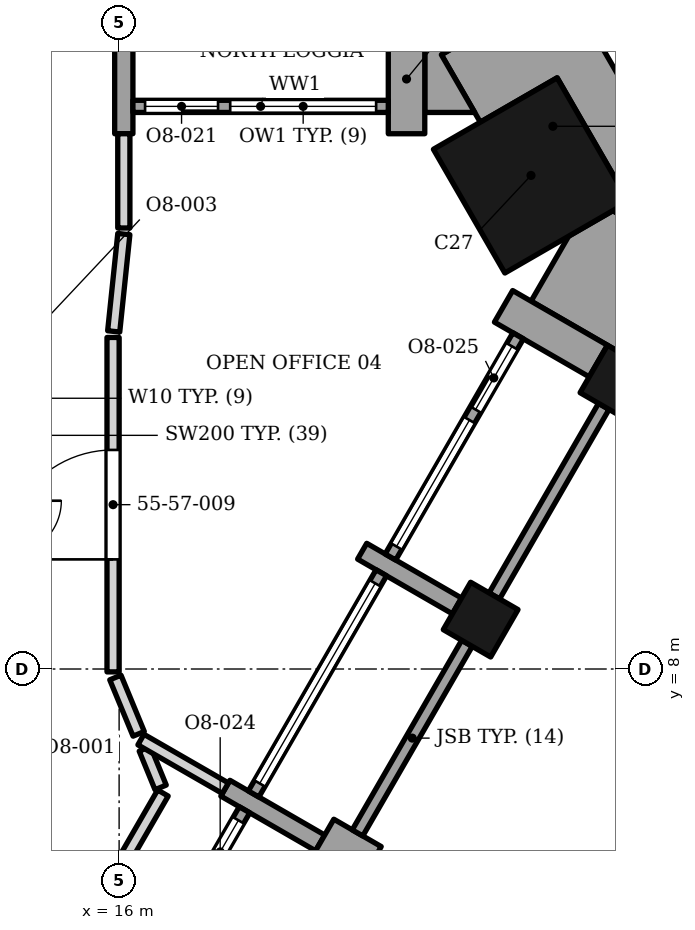
"""IFC4 building model, lengths in metres.
Left out: names, types, materials, properties, quantities, classifications, styles, units other than length and angle.
Written with IfcOpenShell. Run it as: python <this file> out.ifc"""

import sys

from ifc_helpers import new_model, si_unit, direction, frame, frame_2d, origin, origin_2d, place, context, subcontext, project, spatial, polyline, rectangle, outline, extrude, element, fill, save


model = new_model("IFC4")
c1 = context("Model", 3, precision=1e-05, world=origin(), true_north=direction((0.0, 1.0)))
c2 = subcontext(c1, "Body", "Model", "MODEL_VIEW")
j1 = project(units=[si_unit("LENGTHUNIT", "METRE"), si_unit("PLANEANGLEUNIT", "RADIAN")], contexts=[c1])
p1 = place(None, origin())
s1 = spatial("IfcSite", under=j1, at=p1, CompositionType="ELEMENT")
p2 = place(p1, origin())
s2 = spatial("IfcBuilding", under=s1, at=p2, CompositionType="ELEMENT")
p3 = place(p2, frame((0.0, 0.0, 231.5)))
s3 = spatial("IfcBuildingStorey", under=s2, at=p3, CompositionType="ELEMENT", Elevation=231.5)
p4 = place(p3, frame((22.774, 16.117, 0.0), z_axis=(0.0, 0.0, 1.0), x_axis=(-0.866025412511, -0.499999984885, 0.0)))
e1 = element("IfcColumn", 1, at=p4, inside=s3, PredefinedType="COLUMN", context=c2, shape_type="SweptSolid", body=[
    extrude(rectangle(XDim=2.35, YDim=2.35, at=origin_2d()), origin(), (0.0, 0.0, 1.0), 3.9),
])
for number, where, z_axis, x_axis in (
    (2, (21.946, 8.812, 0.0), (0.0, 0.0, 1.0), (0.5, 0.866, 0.0)),
    (3, (24.196, 12.709, 0.0), (0.0, 0.0, 1.0), (0.5, 0.866, 0.0)),
):
    element("IfcColumn", number, at=place(p3, frame(where, z_axis=z_axis, x_axis=x_axis)), inside=s3, PredefinedType="COLUMN", context=c2, shape_type="SweptSolid", body=[
        extrude(rectangle(XDim=0.9, YDim=0.9, at=origin_2d()), origin(), (0.0, 0.0, 1.0), 3.9),
    ])
p5 = place(p3, frame((19.306, 5.14, 0.0), z_axis=(0.0, 0.0, 1.0), x_axis=(0.865896406789, -0.500223362819, 0.0)))
e4 = element("IfcWall", 4, at=p5, inside=s3, PredefinedType="SOLIDWALL", context=c2, shape_type="SweptSolid", body=[
    extrude(rectangle(XDim=0.9, YDim=0.9, at=frame_2d((0.45, 0.0))), origin(), (0.0, 0.0, 1.0), 3.0),
])
p6 = place(p3, frame((19.306, 5.14, 0.0), z_axis=(0.0, 0.0, 1.0), x_axis=(-0.866047807691, 0.499961193289, 0.0)))
e5 = element("IfcWall", 5, at=p6, inside=s3, PredefinedType="SOLIDWALL", context=c2, shape_type="SweptSolid", body=[
    extrude(rectangle(XDim=1.8, YDim=0.3, at=frame_2d((0.9, 0.0))), origin(), (0.0, 0.0, 1.0), 3.0),
])
p7 = place(p3, frame((21.556, 9.037, 0.0), z_axis=(0.0, 0.0, 1.0), x_axis=(-0.866047807691, 0.499961193289, 0.0)))
e6 = element("IfcWall", 6, at=p7, inside=s3, PredefinedType="SOLIDWALL", context=c2, shape_type="SweptSolid", body=[
    extrude(rectangle(XDim=1.8, YDim=0.3, at=frame_2d((0.9, 0.0))), origin(), (0.0, 0.0, 1.0), 2.95),
])
p8 = place(p3, frame((23.881, 13.064, 0.0), z_axis=(0.0, 0.0, 1.0), x_axis=(-0.866047807691, 0.499961193289, 0.0)))
e7 = element("IfcWall", 7, at=p8, inside=s3, PredefinedType="SOLIDWALL", context=c2, shape_type="SweptSolid", body=[
    extrude(rectangle(XDim=1.8, YDim=0.6, at=frame_2d((0.9, 0.0))), origin(), (0.0, 0.0, 1.0), 3.0),
])
p9 = place(p3, frame((15.962, 2.048, 0.0), z_axis=(0.0, 0.0, 1.0), x_axis=(0.500027713859, 0.866009402589, 0.0)))
e8 = element("IfcWall", 8, at=p9, inside=s3, PredefinedType="ELEMENTEDWALL", context=c2, shape_type="SweptSolid", body=[
    extrude(rectangle(XDim=4.2, YDim=0.2, at=frame_2d((2.1, 0.0))), origin(), (0.0, 0.0, 1.0), 3.0),
])
p10 = place(p9, frame((0.2, 0.0, 0.45)))
e9 = element("IfcOpeningElement", 9, at=p10, cuts=e8, PredefinedType="OPENING", context=c2, shape_type="SweptSolid", body=[
    extrude(rectangle(XDim=2.4, YDim=2.25, at=frame_2d((1.2, 1.125))), frame((0.0, 0.11, 0.0), z_axis=(0.0, -1.0, 0.0), x_axis=(1.0, 0.0, 0.0)), (0.0, 0.0, 1.0), 0.22),
])
p11 = place(p9, frame((2.8, 0.0, 0.0)))
e10 = element("IfcOpeningElement", 10, at=p11, cuts=e8, PredefinedType="OPENING", context=c2, shape_type="SweptSolid", body=[
    extrude(rectangle(XDim=1.2, YDim=2.7, at=frame_2d((0.6, 1.35))), frame((0.0, 0.11, 0.0), z_axis=(0.0, -1.0, 0.0), x_axis=(1.0, 0.0, 0.0)), (0.0, 0.0, 1.0), 0.22),
])
p12 = place(p3, frame((19.921, 5.305, 0.0), z_axis=(0.0, 0.0, 1.0), x_axis=(0.500012057535, 0.866018442252, 0.0)))
e11 = element("IfcWall", 11, at=p12, inside=s3, PredefinedType="SOLIDWALL", context=c2, shape_type="SweptSolid", body=[
    extrude(rectangle(XDim=3.6, YDim=0.2, at=frame_2d((1.8, 0.0))), origin(), (0.0, 0.0, 1.0), 3.0),
])
p13 = place(p3, frame((18.212, 5.945, 0.0), z_axis=(0.0, 0.0, 1.0), x_axis=(0.500002543286, 0.866023935413, 0.0)))
e12 = element("IfcWall", 12, at=p13, inside=s3, PredefinedType="ELEMENTEDWALL", context=c2, shape_type="SweptSolid", body=[
    extrude(rectangle(XDim=4.2, YDim=0.2, at=frame_2d((2.1, 0.0))), origin(), (0.0, 0.0, 1.0), 2.95),
])
p14 = place(p13, frame((0.2, 0.0, 0.45)))
e13 = element("IfcOpeningElement", 13, at=p14, cuts=e12, PredefinedType="OPENING", context=c2, shape_type="SweptSolid", body=[
    extrude(rectangle(XDim=3.8, YDim=2.25, at=frame_2d((1.9, 1.125))), frame((0.0, 0.11, 0.0), z_axis=(0.0, -1.0, 0.0), x_axis=(1.0, 0.0, 0.0)), (0.0, 0.0, 1.0), 0.22),
])
p15 = place(p3, frame((22.171, 9.202, 0.0), z_axis=(0.0, 0.0, 1.0), x_axis=(0.500012057535, 0.866018442252, 0.0)))
e14 = element("IfcWall", 14, at=p15, inside=s3, PredefinedType="SOLIDWALL", context=c2, shape_type="SweptSolid", body=[
    extrude(rectangle(XDim=3.6, YDim=0.2, at=frame_2d((1.8, 0.0))), origin(), (0.0, 0.0, 1.0), 3.0),
])
p16 = place(p3, frame((20.462, 9.842, 0.0), z_axis=(0.0, 0.0, 1.0), x_axis=(0.500027713859, 0.866009402589, 0.0)))
e15 = element("IfcWall", 15, at=p16, inside=s3, PredefinedType="ELEMENTEDWALL", context=c2, shape_type="SweptSolid", body=[
    extrude(rectangle(XDim=4.2, YDim=0.2, at=frame_2d((2.1, 0.0))), origin(), (0.0, 0.0, 1.0), 3.0),
])
p17 = place(p16, frame((0.2, 0.0, 0.45)))
e16 = element("IfcOpeningElement", 16, at=p17, cuts=e15, PredefinedType="OPENING", context=c2, shape_type="SweptSolid", body=[
    extrude(rectangle(XDim=2.4, YDim=2.25, at=frame_2d((1.2, 1.125))), frame((0.0, 0.11, 0.0), z_axis=(0.0, -1.0, 0.0), x_axis=(1.0, 0.0, 0.0)), (0.0, 0.0, 1.0), 0.22),
])
p18 = place(p16, frame((2.8, 0.0, 0.0)))
e17 = element("IfcOpeningElement", 17, at=p18, cuts=e15, PredefinedType="OPENING", context=c2, shape_type="SweptSolid", body=[
    extrude(rectangle(XDim=1.2, YDim=2.7, at=frame_2d((0.6, 1.35))), frame((0.0, 0.11, 0.0), z_axis=(0.0, -1.0, 0.0), x_axis=(1.0, 0.0, 0.0)), (0.0, 0.0, 1.0), 0.22),
])
p19 = place(p3, origin())
e18 = element("IfcWall", 18, at=p19, inside=s3, PredefinedType="SOLIDWALL", context=c2, shape_type="SweptSolid", body=[
    extrude(outline(polyline([(21.027, 16.802), (21.027, 18.603), (20.427, 18.603), (20.427, 16.802), (21.027, 16.802)])), origin(), (0.0, 0.0, 1.0), 3.0),
])
p20 = place(p3, origin())
e19 = element("IfcWall", 19, at=p20, inside=s3, PredefinedType="SOLIDWALL", context=c2, shape_type="SweptSolid", body=[
    extrude(outline(polyline([(15.927, 18.603), (15.927, 16.802), (16.227, 16.802), (16.227, 18.603), (15.927, 18.603)])), origin(), (0.0, 0.0, 1.0), 3.0),
])
p21 = place(p3, frame((20.427, 17.252, 0.0), z_axis=(0.0, 0.0, 1.0), x_axis=(-1.0, 0.0, 0.0)))
e20 = element("IfcWall", 20, at=p21, inside=s3, PredefinedType="ELEMENTEDWALL", context=c2, shape_type="SweptSolid", body=[
    extrude(rectangle(XDim=4.2, YDim=0.2, at=frame_2d((2.1, 0.0))), origin(), (0.0, 0.0, 1.0), 3.0),
])
p22 = place(p21, frame((0.2, 0.0, 0.45)))
e21 = element("IfcOpeningElement", 21, at=p22, cuts=e20, PredefinedType="OPENING", context=c2, shape_type="SweptSolid", body=[
    extrude(rectangle(XDim=2.4, YDim=2.25, at=frame_2d((1.2, 1.125))), frame((0.0, 0.11, 0.0), z_axis=(0.0, -1.0, 0.0), x_axis=(1.0, 0.0, 0.0)), (0.0, 0.0, 1.0), 0.22),
])
p23 = place(p21, frame((2.8, 0.0, 0.0)))
e22 = element("IfcOpeningElement", 22, at=p23, cuts=e20, PredefinedType="OPENING", context=c2, shape_type="SweptSolid", body=[
    extrude(rectangle(XDim=1.2, YDim=2.7, at=frame_2d((0.6, 1.35))), frame((0.0, 0.11, 0.0), z_axis=(0.0, -1.0, 0.0), x_axis=(1.0, 0.0, 0.0)), (0.0, 0.0, 1.0), 0.22),
])
p24 = place(p3, origin())
e23 = element("IfcWall", 23, at=p24, inside=s3, PredefinedType="SOLIDWALL", context=c2, shape_type="SweptSolid", body=[
    extrude(outline(polyline([(23.392, 15.117), (22.776, 14.049), (24.364, 13.132), (24.364, 13.861), (25.353, 14.825), (24.12, 15.537), (23.392, 15.117)])), origin(), (0.0, 0.0, 1.0), 3.0),
])
p25 = place(p3, origin())
e24 = element("IfcWall", 24, at=p25, inside=s3, PredefinedType="SOLIDWALL", context=c2, shape_type="SweptSolid", body=[
    extrude(outline(polyline([(23.204, 17.722), (24.379, 15.687), (24.12, 15.537), (25.353, 14.825), (25.706, 15.17), (23.334, 19.278), (21.299, 18.103), (21.94, 16.992), (23.204, 17.722)])), origin(), (0.0, 0.0, 1.0), 3.0),
])
p26 = place(p3, origin())
e25 = element("IfcWall", 25, at=p26, inside=s3, PredefinedType="SOLIDWALL", context=c2, shape_type="SweptSolid", body=[
    extrude(outline(polyline([(21.027, 18.884), (21.027, 17.153), (21.848, 17.153), (21.299, 18.103), (22.945, 19.052), (22.945, 19.24), (21.978, 18.884), (21.027, 18.884)])), origin(), (0.0, 0.0, 1.0), 3.0),
])
p27 = place(p3, frame((15.531, 3.9, 0.0), z_axis=(0.0, 0.0, 1.0), x_axis=(0.500122053881, 0.865954924474, 0.0)))
e26 = element("IfcWall", 26, at=p27, inside=s3, PredefinedType="PARTITIONING", context=c2, shape_type="SweptSolid", body=[
    extrude(rectangle(XDim=2.38, YDim=0.2, at=frame_2d((1.19, 0.0))), origin(), (0.0, 0.0, 1.0), 3.128),
])
p28 = place(p3, frame((16.423, 6.687, 0.0), z_axis=(0.0, 0.0, 1.0), x_axis=(0.37899342687, -0.925399363729, 0.0)))
e27 = element("IfcWall", 27, at=p28, inside=s3, PredefinedType="PARTITIONING", context=c2, shape_type="SweptSolid", body=[
    extrude(rectangle(XDim=0.685, YDim=0.2, at=frame_2d((0.343, 0.0))), origin(), (0.0, 0.0, 1.0), 3.73),
])
p29 = place(p3, frame((16.359, 6.839, 0.0), z_axis=(0.0, 0.0, 1.0), x_axis=(0.866578526371, -0.499040737448, 0.0)))
e28 = element("IfcWall", 28, at=p29, inside=s3, PredefinedType="PARTITIONING", context=c2, shape_type="SweptSolid", body=[
    extrude(rectangle(XDim=1.602, YDim=0.2, at=frame_2d((0.801, 0.0))), origin(), (0.0, 0.0, 1.0), 3.73),
])
p30 = place(p3, frame((15.939, 7.86, 0.0), z_axis=(0.0, 0.0, 1.0), x_axis=(0.38186417336, -0.924218455293, 0.0)))
e29 = element("IfcWall", 29, at=p30, inside=s3, PredefinedType="PARTITIONING", context=c2, shape_type="SweptSolid", body=[
    extrude(rectangle(XDim=1.002, YDim=0.2, at=frame_2d((0.501, 0.0))), origin(), (0.0, 0.0, 1.0), 3.73),
])
p31 = place(p3, frame((15.9, 7.953, 0.0), z_axis=(0.0, 0.0, 1.0), x_axis=(0.0, 1.0, 0.0)))
e30 = element("IfcWall", 30, at=p31, inside=s3, PredefinedType="PARTITIONING", context=c2, shape_type="SweptSolid", body=[
    extrude(rectangle(XDim=5.5, YDim=0.2, at=frame_2d((2.75, 0.0))), origin(), (0.0, 0.0, 1.0), 2.95),
])
p32 = place(p31, frame((1.85, 0.0, 0.0)))
e31 = element("IfcOpeningElement", 31, at=p32, cuts=e30, PredefinedType="OPENING", context=c2, shape_type="SweptSolid", body=[
    extrude(rectangle(XDim=1.8, YDim=2.4, at=frame_2d((0.9, 1.2))), frame((0.0, 0.11, 0.0), z_axis=(0.0, -1.0, 0.0), x_axis=(1.0, 0.0, 0.0)), (0.0, 0.0, 1.0), 0.22),
])
p33 = place(p3, frame((15.911, 13.552, 0.0), z_axis=(0.0, 0.0, 1.0), x_axis=(0.103468505511, 0.994632730392, 0.0)))
e32 = element("IfcWall", 32, at=p33, inside=s3, PredefinedType="PARTITIONING", context=c2, shape_type="SweptSolid", body=[
    extrude(rectangle(XDim=1.609, YDim=0.2, at=frame_2d((0.805, 0.0))), origin(), (0.0, 0.0, 1.0), 3.128),
])
p34 = place(p3, frame((16.077, 15.252, 0.0), z_axis=(0.0, 0.0, 1.0), x_axis=(0.0, 1.0, 0.0)))
e33 = element("IfcWall", 33, at=p34, inside=s3, PredefinedType="PARTITIONING", context=c2, shape_type="SweptSolid", body=[
    extrude(rectangle(XDim=1.55, YDim=0.2, at=frame_2d((0.775, 0.0))), origin(), (0.0, 0.0, 1.0), 3.73),
])
p35 = place(p11, origin())
e34 = element("IfcDoor", 34, at=p35, inside=s3, OperationType="SINGLE_SWING_LEFT", PredefinedType="DOOR", context=c2, shape_type="SweptSolid", body=[
    extrude(rectangle(XDim=1.2, YDim=2.7, at=frame_2d((0.6, 1.35))), frame((0.0, 0.025, 0.0), z_axis=(0.0, -1.0, 0.0), x_axis=(1.0, 0.0, 0.0)), (0.0, 0.0, 1.0), 0.05),
])
fill(e10, e34)
p36 = place(p14, origin())
e35 = element("IfcWindow", 35, at=p36, inside=s3, PartitioningType="SINGLE_PANEL", PredefinedType="WINDOW", context=c2, shape_type="SweptSolid", body=[
    extrude(rectangle(XDim=3.8, YDim=2.25, at=frame_2d((1.9, 1.125))), frame((0.0, 0.03, 0.0), z_axis=(0.0, -1.0, 0.0), x_axis=(1.0, 0.0, 0.0)), (0.0, 0.0, 1.0), 0.06),
])
fill(e13, e35)
p37 = place(p17, origin())
e36 = element("IfcWindow", 36, at=p37, inside=s3, PartitioningType="SINGLE_PANEL", PredefinedType="WINDOW", context=c2, shape_type="SweptSolid", body=[
    extrude(rectangle(XDim=2.4, YDim=2.25, at=frame_2d((1.2, 1.125))), frame((0.0, 0.03, 0.0), z_axis=(0.0, -1.0, 0.0), x_axis=(1.0, 0.0, 0.0)), (0.0, 0.0, 1.0), 0.06),
])
fill(e16, e36)
p38 = place(p18, origin())
e37 = element("IfcDoor", 37, at=p38, inside=s3, OperationType="SINGLE_SWING_LEFT", PredefinedType="DOOR", context=c2, shape_type="SweptSolid", body=[
    extrude(rectangle(XDim=1.2, YDim=2.7, at=frame_2d((0.6, 1.35))), frame((0.0, 0.025, 0.0), z_axis=(0.0, -1.0, 0.0), x_axis=(1.0, 0.0, 0.0)), (0.0, 0.0, 1.0), 0.05),
])
fill(e17, e37)
p39 = place(p22, origin())
e38 = element("IfcWindow", 38, at=p39, inside=s3, PartitioningType="SINGLE_PANEL", PredefinedType="WINDOW", context=c2, shape_type="SweptSolid", body=[
    extrude(rectangle(XDim=2.4, YDim=2.25, at=frame_2d((1.2, 1.125))), frame((0.0, 0.03, 0.0), z_axis=(0.0, -1.0, 0.0), x_axis=(1.0, 0.0, 0.0)), (0.0, 0.0, 1.0), 0.06),
])
fill(e21, e38)
p40 = place(p23, origin())
e39 = element("IfcDoor", 39, at=p40, inside=s3, OperationType="SINGLE_SWING_LEFT", PredefinedType="DOOR", context=c2, shape_type="SweptSolid", body=[
    extrude(rectangle(XDim=1.2, YDim=2.7, at=frame_2d((0.6, 1.35))), frame((0.0, 0.025, 0.0), z_axis=(0.0, -1.0, 0.0), x_axis=(1.0, 0.0, 0.0)), (0.0, 0.0, 1.0), 0.05),
])
fill(e22, e39)
p41 = place(p32, origin())
e40 = element("IfcDoor", 40, at=p41, inside=s3, OperationType="DOUBLE_DOOR_SINGLE_SWING", PredefinedType="DOOR", context=c2, shape_type="SweptSolid", body=[
    extrude(rectangle(XDim=1.8, YDim=2.4, at=frame_2d((0.9, 1.2))), frame((0.0, 0.025, 0.0), z_axis=(0.0, -1.0, 0.0), x_axis=(1.0, 0.0, 0.0)), (0.0, 0.0, 1.0), 0.05),
])
fill(e31, e40)
save(model, sys.argv[1])
